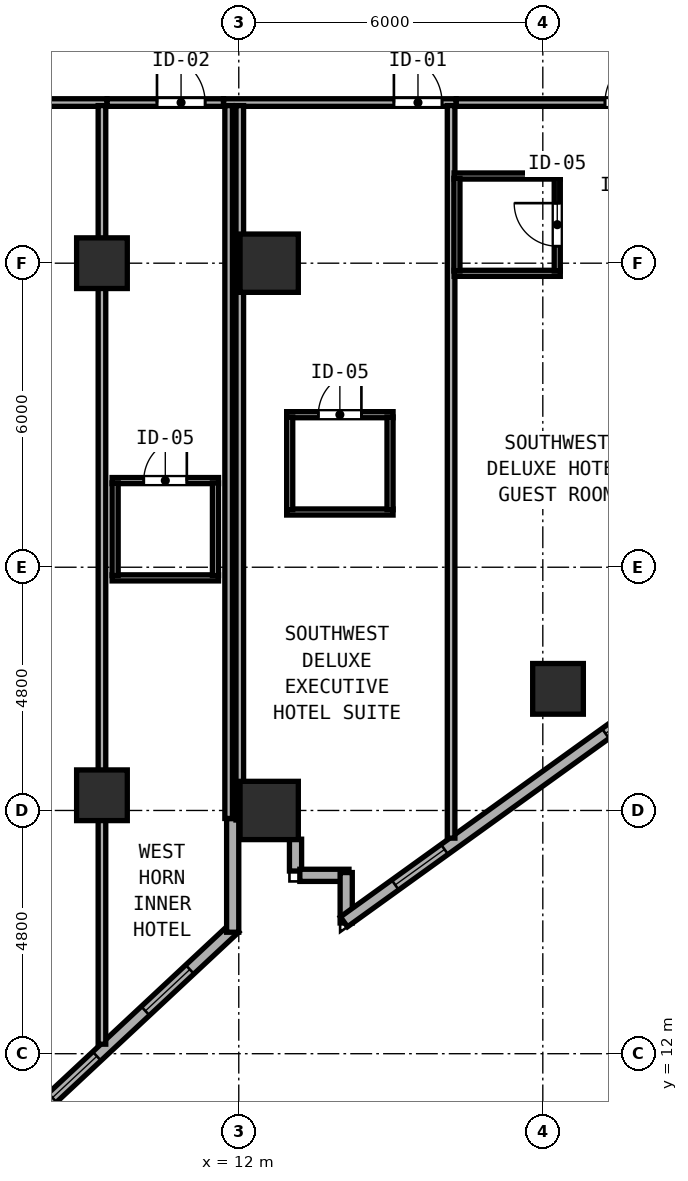
"""IFC4 building model, lengths in metres.
Left out: names, types, materials, properties, quantities, classifications, styles, units other than length and angle.
Written with IfcOpenShell. Run it as: python <this file> out.ifc"""

import sys

from ifc_helpers import new_model, si_unit, direction, frame, frame_2d, origin, origin_2d, place, context, subcontext, project, spatial, rectangle, hollow_rectangle, extrude, element, fill, save


model = new_model("IFC4")
c1 = context("Model", 3, precision=1e-05, world=origin(), true_north=direction((0.0, 1.0)))
c2 = subcontext(c1, "Body", "Model", "MODEL_VIEW")
j1 = project(units=[si_unit("LENGTHUNIT", "METRE"), si_unit("PLANEANGLEUNIT", "RADIAN")], contexts=[c1])
p1 = place(None, origin())
s1 = spatial("IfcSite", under=j1, at=p1, CompositionType="ELEMENT")
p2 = place(p1, origin())
s2 = spatial("IfcBuilding", under=s1, at=p2, CompositionType="ELEMENT")
p3 = place(p2, frame((0.0, 0.0, 78.0)))
s3 = spatial("IfcBuildingStorey", under=s2, at=p3, CompositionType="ELEMENT", Elevation=78.0)
for number, where, z_axis, x_axis in (
    (1, (12.6, 16.8, 0.0), (0.0, 0.0, 1.0), (1.0, 0.0, 0.0)),
    (2, (12.6, 27.6, 0.0), (0.0, 0.0, 1.0), (1.0, 0.0, 0.0)),
):
    element("IfcColumn", number, at=place(p3, frame(where, z_axis=z_axis, x_axis=x_axis)), inside=s3, PredefinedType="COLUMN", context=c2, shape_type="SweptSolid", body=[
        extrude(hollow_rectangle(XDim=1.15, YDim=1.15, WallThickness=0.042, at=origin_2d()), origin(), (0.0, 0.0, 1.0), 3.8),
    ])
for number, where, z_axis, x_axis in (
    (3, (18.3, 19.2, 0.0), (0.0, 0.0, 1.0), (1.0, 0.0, 0.0)),
    (4, (9.3, 17.1, 0.0), (0.0, 0.0, 1.0), (1.0, 0.0, 0.0)),
    (5, (9.3, 27.6, 0.0), (0.0, 0.0, 1.0), (1.0, 0.0, 0.0)),
):
    element("IfcColumn", number, at=place(p3, frame(where, z_axis=z_axis, x_axis=x_axis)), inside=s3, PredefinedType="COLUMN", context=c2, shape_type="SweptSolid", body=[
        extrude(hollow_rectangle(XDim=1.0, YDim=1.0, WallThickness=0.038, at=origin_2d()), origin(), (0.0, 0.0, 1.0), 3.8),
    ])
p4 = place(p3, frame((3.27, 6.416, 0.0), z_axis=(0.0, 0.0, 1.0), x_axis=(0.731064187858, 0.682308693505, 0.0)))
e6 = element("IfcWall", 6, at=p4, inside=s3, PredefinedType="SOLIDWALL", context=c2, shape_type="SweptSolid", body=[
    extrude(rectangle(XDim=11.833, YDim=0.24, at=frame_2d((5.916, 0.0))), origin(), (0.0, 0.0, 1.0), 3.6),
])
p5 = place(p4, frame((1.6, 0.0, 0.85)))
e7 = element("IfcOpeningElement", 7, at=p5, cuts=e6, PredefinedType="OPENING", context=c2, shape_type="SweptSolid", body=[
    extrude(rectangle(XDim=1.2, YDim=1.85, at=frame_2d((0.6, 0.925))), frame((0.0, 0.13, 0.0), z_axis=(0.0, -1.0, 0.0), x_axis=(1.0, 0.0, 0.0)), (0.0, 0.0, 1.0), 0.26),
])
p6 = place(p4, frame((6.912, 0.0, 0.85)))
e8 = element("IfcOpeningElement", 8, at=p6, cuts=e6, PredefinedType="OPENING", context=c2, shape_type="SweptSolid", body=[
    extrude(rectangle(XDim=1.2, YDim=1.85, at=frame_2d((0.6, 0.925))), frame((0.0, 0.13, 0.0), z_axis=(0.0, -1.0, 0.0), x_axis=(1.0, 0.0, 0.0)), (0.0, 0.0, 1.0), 0.26),
])
p7 = place(p4, frame((9.421, 0.0, 0.85)))
e9 = element("IfcOpeningElement", 9, at=p7, cuts=e6, PredefinedType="OPENING", context=c2, shape_type="SweptSolid", body=[
    extrude(rectangle(XDim=1.2, YDim=1.85, at=frame_2d((0.6, 0.925))), frame((0.0, 0.13, 0.0), z_axis=(0.0, -1.0, 0.0), x_axis=(1.0, 0.0, 0.0)), (0.0, 0.0, 1.0), 0.26),
])
p8 = place(p3, frame((11.88, 14.397, 0.0), z_axis=(0.0, 0.0, 1.0), x_axis=(0.0, 1.0, 0.0)))
e10 = element("IfcWall", 10, at=p8, inside=s3, PredefinedType="SOLIDWALL", context=c2, shape_type="SweptSolid", body=[
    extrude(rectangle(XDim=2.243, YDim=0.24, at=frame_2d((1.121, 0.0))), origin(), (0.0, 0.0, 1.0), 3.6),
])
p9 = place(p3, frame((13.12, 16.233, 0.0), z_axis=(0.0, 0.0, 1.0), x_axis=(0.0, -1.0, 0.0)))
e11 = element("IfcWall", 11, at=p9, inside=s3, PredefinedType="SOLIDWALL", context=c2, shape_type="SweptSolid", body=[
    extrude(rectangle(XDim=0.628, YDim=0.24, at=frame_2d((0.314, 0.0))), origin(), (0.0, 0.0, 1.0), 3.6),
])
p10 = place(p3, frame((13.205, 15.52, 0.0), z_axis=(0.0, 0.0, 1.0), x_axis=(1.0, 0.0, 0.0)))
e12 = element("IfcWall", 12, at=p10, inside=s3, PredefinedType="SOLIDWALL", context=c2, shape_type="SweptSolid", body=[
    extrude(rectangle(XDim=0.97, YDim=0.24, at=frame_2d((0.485, 0.0))), origin(), (0.0, 0.0, 1.0), 3.6),
])
p11 = place(p3, frame((14.12, 15.575, 0.0), z_axis=(0.0, 0.0, 1.0), x_axis=(0.0, -1.0, 0.0)))
e13 = element("IfcWall", 13, at=p11, inside=s3, PredefinedType="SOLIDWALL", context=c2, shape_type="SweptSolid", body=[
    extrude(rectangle(XDim=0.996, YDim=0.24, at=frame_2d((0.498, 0.0))), origin(), (0.0, 0.0, 1.0), 3.6),
])
p12 = place(p3, frame((14.075, 14.602, 0.0), z_axis=(0.0, 0.0, 1.0), x_axis=(0.811543176492, 0.58429245476, 0.0)))
e14 = element("IfcWall", 14, at=p12, inside=s3, PredefinedType="SOLIDWALL", context=c2, shape_type="SweptSolid", body=[
    extrude(rectangle(XDim=11.531, YDim=0.24, at=frame_2d((5.765, 0.0))), origin(), (0.0, 0.0, 1.0), 3.097),
])
p13 = place(p12, frame((1.246, 0.0, 0.85)))
e15 = element("IfcOpeningElement", 15, at=p13, cuts=e14, PredefinedType="OPENING", context=c2, shape_type="SweptSolid", body=[
    extrude(rectangle(XDim=1.2, YDim=1.85, at=frame_2d((0.6, 0.925))), frame((0.0, 0.13, 0.0), z_axis=(0.0, -1.0, 0.0), x_axis=(1.0, 0.0, 0.0)), (0.0, 0.0, 1.0), 0.26),
])
p14 = place(p12, frame((6.36, 0.0, 0.85)))
e16 = element("IfcOpeningElement", 16, at=p14, cuts=e14, PredefinedType="OPENING", context=c2, shape_type="SweptSolid", body=[
    extrude(rectangle(XDim=1.2, YDim=1.85, at=frame_2d((0.6, 0.925))), frame((0.0, 0.13, 0.0), z_axis=(0.0, -1.0, 0.0), x_axis=(1.0, 0.0, 0.0)), (0.0, 0.0, 1.0), 0.26),
])
p15 = place(p12, frame((9.07, 0.0, 0.85)))
e17 = element("IfcOpeningElement", 17, at=p15, cuts=e14, PredefinedType="OPENING", context=c2, shape_type="SweptSolid", body=[
    extrude(rectangle(XDim=1.2, YDim=1.85, at=frame_2d((0.6, 0.925))), frame((0.0, 0.13, 0.0), z_axis=(0.0, -1.0, 0.0), x_axis=(1.0, 0.0, 0.0)), (0.0, 0.0, 1.0), 0.26),
])
p16 = place(p3, frame((12.173, 33.524, 0.0), z_axis=(0.0, 0.0, 1.0), x_axis=(-0.963197271032, -0.268795493036, 0.0)))
e18 = element("IfcWall", 18, at=p16, inside=s3, PredefinedType="SOLIDWALL", context=c2, shape_type="SweptSolid", body=[
    extrude(rectangle(XDim=9.095, YDim=0.24, at=frame_2d((4.548, 0.0))), origin(), (0.0, 0.0, 1.0), 3.6),
])
p17 = place(p16, frame((1.6, 0.0, 0.85)))
e19 = element("IfcOpeningElement", 19, at=p17, cuts=e18, PredefinedType="OPENING", context=c2, shape_type="SweptSolid", body=[
    extrude(rectangle(XDim=1.2, YDim=1.85, at=frame_2d((0.6, 0.925))), frame((0.0, 0.13, 0.0), z_axis=(0.0, -1.0, 0.0), x_axis=(1.0, 0.0, 0.0)), (0.0, 0.0, 1.0), 0.26),
])
p18 = place(p16, frame((7.0, 0.0, 0.85)))
e20 = element("IfcOpeningElement", 20, at=p18, cuts=e18, PredefinedType="OPENING", context=c2, shape_type="SweptSolid", body=[
    extrude(rectangle(XDim=1.2, YDim=1.85, at=frame_2d((0.6, 0.925))), frame((0.0, 0.13, 0.0), z_axis=(0.0, -1.0, 0.0), x_axis=(1.0, 0.0, 0.0)), (0.0, 0.0, 1.0), 0.26),
])
p19 = place(p3, frame((11.7, 30.77, 0.0), z_axis=(0.0, 0.0, 1.0), x_axis=(1.0, 0.0, 0.0)))
e21 = element("IfcWall", 21, at=p19, inside=s3, PredefinedType="PARTITIONING", context=c2, shape_type="SweptSolid", body=[
    extrude(rectangle(XDim=4.59, YDim=0.15, at=frame_2d((2.295, 0.0))), origin(), (0.0, 0.0, 1.0), 3.6),
])
p20 = place(p19, frame((4.311, 0.0, 0.0), z_axis=(0.0, 0.0, 1.0), x_axis=(-1.0, 0.0, 0.0)))
e22 = element("IfcOpeningElement", 22, at=p20, cuts=e21, PredefinedType="OPENING", context=c2, shape_type="SweptSolid", body=[
    extrude(rectangle(XDim=0.95, YDim=2.18, at=frame_2d((0.475, 1.09))), frame((0.0, 0.085, 0.0), z_axis=(0.0, -1.0, 0.0), x_axis=(1.0, 0.0, 0.0)), (0.0, 0.0, 1.0), 0.17),
])
p21 = place(p3, frame((11.8, 16.642, 0.0), z_axis=(0.0, 0.0, 1.0), x_axis=(0.0, 1.0, 0.0)))
e23 = element("IfcWall", 23, at=p21, inside=s3, PredefinedType="PARTITIONING", context=c2, shape_type="SweptSolid", body=[
    extrude(rectangle(XDim=14.068, YDim=0.15, at=frame_2d((7.034, 0.0))), origin(), (0.0, 0.0, 1.0), 3.6),
])
p22 = place(p3, frame((16.19, 16.254, 0.0), z_axis=(0.0, 0.0, 1.0), x_axis=(0.0, 1.0, 0.0)))
e24 = element("IfcWall", 24, at=p22, inside=s3, PredefinedType="PARTITIONING", context=c2, shape_type="SweptSolid", body=[
    extrude(rectangle(XDim=14.456, YDim=0.15, at=frame_2d((7.228, 0.0))), origin(), (0.0, 0.0, 1.0), 3.6),
])
p23 = place(p3, frame((12.945, 24.61, 0.0), z_axis=(0.0, 0.0, 1.0), x_axis=(1.0, 0.0, 0.0)))
e25 = element("IfcWall", 25, at=p23, inside=s3, PredefinedType="PARTITIONING", context=c2, shape_type="SweptSolid", body=[
    extrude(rectangle(XDim=2.1, YDim=0.12, at=frame_2d((1.05, 0.0))), origin(), (0.0, 0.0, 1.0), 3.6),
])
p24 = place(p23, frame((1.475, 0.0, 0.0), z_axis=(0.0, 0.0, 1.0), x_axis=(-1.0, 0.0, 0.0)))
e26 = element("IfcOpeningElement", 26, at=p24, cuts=e25, PredefinedType="OPENING", context=c2, shape_type="SweptSolid", body=[
    extrude(rectangle(XDim=0.85, YDim=2.1, at=frame_2d((0.425, 1.05))), frame((0.0, 0.07, 0.0), z_axis=(0.0, -1.0, 0.0), x_axis=(1.0, 0.0, 0.0)), (0.0, 0.0, 1.0), 0.14),
])
p25 = place(p3, frame((12.945, 22.69, 0.0), z_axis=(0.0, 0.0, 1.0), x_axis=(1.0, 0.0, 0.0)))
e27 = element("IfcWall", 27, at=p25, inside=s3, PredefinedType="PARTITIONING", context=c2, shape_type="SweptSolid", body=[
    extrude(rectangle(XDim=2.1, YDim=0.12, at=frame_2d((1.05, 0.0))), origin(), (0.0, 0.0, 1.0), 3.6),
])
for number, where, z_axis, x_axis in (
    (28, (13.005, 22.735, 0.0), (0.0, 0.0, 1.0), (0.0, 1.0, 0.0)),
    (29, (14.985, 22.735, 0.0), (0.0, 0.0, 1.0), (0.0, 1.0, 0.0)),
):
    element("IfcWall", number, at=place(p3, frame(where, z_axis=z_axis, x_axis=x_axis)), inside=s3, PredefinedType="PARTITIONING", context=c2, shape_type="SweptSolid", body=[
        extrude(rectangle(XDim=1.83, YDim=0.12, at=frame_2d((0.915, 0.0))), origin(), (0.0, 0.0, 1.0), 3.6),
    ])
p26 = place(p3, frame((16.292, 30.77, 0.0), z_axis=(0.0, 0.0, 1.0), x_axis=(1.0, 0.0, 0.0)))
e30 = element("IfcWall", 30, at=p26, inside=s3, PredefinedType="PARTITIONING", context=c2, shape_type="SweptSolid", body=[
    extrude(rectangle(XDim=4.148, YDim=0.15, at=frame_2d((2.074, 0.0))), origin(), (0.0, 0.0, 1.0), 3.6),
])
p27 = place(p26, frame((3.885, 0.0, 0.0), z_axis=(0.0, 0.0, 1.0), x_axis=(-1.0, 0.0, 0.0)))
e31 = element("IfcOpeningElement", 31, at=p27, cuts=e30, PredefinedType="OPENING", context=c2, shape_type="SweptSolid", body=[
    extrude(rectangle(XDim=0.95, YDim=2.15, at=frame_2d((0.475, 1.075))), frame((0.0, 0.085, 0.0), z_axis=(0.0, -1.0, 0.0), x_axis=(1.0, 0.0, 0.0)), (0.0, 0.0, 1.0), 0.17),
])
p28 = place(p3, frame((16.25, 29.32, 0.0), z_axis=(0.0, 0.0, 1.0), x_axis=(1.0, 0.0, 0.0)))
e32 = element("IfcWall", 32, at=p28, inside=s3, PredefinedType="PARTITIONING", context=c2, shape_type="SweptSolid", body=[
    extrude(rectangle(XDim=2.095, YDim=0.12, at=frame_2d((1.047, 0.0))), origin(), (0.0, 0.0, 1.0), 3.6),
])
p29 = place(p3, frame((16.25, 27.4, 0.0), z_axis=(0.0, 0.0, 1.0), x_axis=(1.0, 0.0, 0.0)))
e33 = element("IfcWall", 33, at=p29, inside=s3, PredefinedType="PARTITIONING", context=c2, shape_type="SweptSolid", body=[
    extrude(rectangle(XDim=2.095, YDim=0.12, at=frame_2d((1.047, 0.0))), origin(), (0.0, 0.0, 1.0), 3.097),
])
p30 = place(p3, frame((16.305, 27.445, 0.0), z_axis=(0.0, 0.0, 1.0), x_axis=(0.0, 1.0, 0.0)))
e34 = element("IfcWall", 34, at=p30, inside=s3, PredefinedType="PARTITIONING", context=c2, shape_type="SweptSolid", body=[
    extrude(rectangle(XDim=1.83, YDim=0.12, at=frame_2d((0.915, 0.0))), origin(), (0.0, 0.0, 1.0), 3.6),
])
p31 = place(p3, frame((18.285, 27.445, 0.0), z_axis=(0.0, 0.0, 1.0), x_axis=(0.0, 1.0, 0.0)))
e35 = element("IfcWall", 35, at=p31, inside=s3, PredefinedType="PARTITIONING", context=c2, shape_type="SweptSolid", body=[
    extrude(rectangle(XDim=1.83, YDim=0.12, at=frame_2d((0.915, 0.0))), origin(), (0.0, 0.0, 1.0), 3.6),
])
p32 = place(p31, frame((0.49, 0.0, 0.0)))
e36 = element("IfcOpeningElement", 36, at=p32, cuts=e35, PredefinedType="OPENING", context=c2, shape_type="SweptSolid", body=[
    extrude(rectangle(XDim=0.85, YDim=2.1, at=frame_2d((0.425, 1.05))), frame((0.0, 0.07, 0.0), z_axis=(0.0, -1.0, 0.0), x_axis=(1.0, 0.0, 0.0)), (0.0, 0.0, 1.0), 0.14),
])
p33 = place(p3, frame((3.311, 30.77, 0.0), z_axis=(0.0, 0.0, 1.0), x_axis=(1.0, 0.0, 0.0)))
e37 = element("IfcWall", 37, at=p33, inside=s3, PredefinedType="PARTITIONING", context=c2, shape_type="SweptSolid", body=[
    extrude(rectangle(XDim=6.089, YDim=0.15, at=frame_2d((3.044, 0.0))), origin(), (0.0, 0.0, 1.0), 3.6),
])
p34 = place(p33, frame((4.801, 0.0, 0.0), z_axis=(0.0, 0.0, 1.0), x_axis=(-1.0, 0.0, 0.0)))
e38 = element("IfcOpeningElement", 38, at=p34, cuts=e37, PredefinedType="OPENING", context=c2, shape_type="SweptSolid", body=[
    extrude(rectangle(XDim=0.95, YDim=2.18, at=frame_2d((0.475, 1.09))), frame((0.0, 0.085, 0.0), z_axis=(0.0, -1.0, 0.0), x_axis=(1.0, 0.0, 0.0)), (0.0, 0.0, 1.0), 0.17),
])
p35 = place(p3, frame((9.3, 12.188, 0.0), z_axis=(0.0, 0.0, 1.0), x_axis=(0.0, 1.0, 0.0)))
e39 = element("IfcWall", 39, at=p35, inside=s3, PredefinedType="PARTITIONING", context=c2, shape_type="SweptSolid", body=[
    extrude(rectangle(XDim=18.522, YDim=0.15, at=frame_2d((9.261, 0.0))), origin(), (0.0, 0.0, 1.0), 3.6),
])
p36 = place(p3, frame((9.402, 30.77, 0.0), z_axis=(0.0, 0.0, 1.0), x_axis=(1.0, 0.0, 0.0)))
e40 = element("IfcWall", 40, at=p36, inside=s3, PredefinedType="PARTITIONING", context=c2, shape_type="SweptSolid", body=[
    extrude(rectangle(XDim=2.296, YDim=0.15, at=frame_2d((1.148, 0.0))), origin(), (0.0, 0.0, 1.0), 3.6),
])
p37 = place(p36, frame((1.934, 0.0, 0.0), z_axis=(0.0, 0.0, 1.0), x_axis=(-1.0, 0.0, 0.0)))
e41 = element("IfcOpeningElement", 41, at=p37, cuts=e40, PredefinedType="OPENING", context=c2, shape_type="SweptSolid", body=[
    extrude(rectangle(XDim=0.95, YDim=2.15, at=frame_2d((0.475, 1.075))), frame((0.0, 0.085, 0.0), z_axis=(0.0, -1.0, 0.0), x_axis=(1.0, 0.0, 0.0)), (0.0, 0.0, 1.0), 0.17),
])
p38 = place(p3, frame((12.02, 16.612, 0.0), z_axis=(0.0, 0.0, 1.0), x_axis=(0.0, 1.0, 0.0)))
e42 = element("IfcWall", 42, at=p38, inside=s3, PredefinedType="PARTITIONING", context=c2, shape_type="SweptSolid", body=[
    extrude(rectangle(XDim=14.098, YDim=0.15, at=frame_2d((7.049, 0.0))), origin(), (0.0, 0.0, 1.0), 3.6),
])
p39 = place(p3, frame((9.5, 23.31, 0.0), z_axis=(0.0, 0.0, 1.0), x_axis=(1.0, 0.0, 0.0)))
e43 = element("IfcWall", 43, at=p39, inside=s3, PredefinedType="PARTITIONING", context=c2, shape_type="SweptSolid", body=[
    extrude(rectangle(XDim=2.1, YDim=0.12, at=frame_2d((1.05, 0.0))), origin(), (0.0, 0.0, 1.0), 3.6),
])
p40 = place(p39, frame((1.475, 0.0, 0.0), z_axis=(0.0, 0.0, 1.0), x_axis=(-1.0, 0.0, 0.0)))
e44 = element("IfcOpeningElement", 44, at=p40, cuts=e43, PredefinedType="OPENING", context=c2, shape_type="SweptSolid", body=[
    extrude(rectangle(XDim=0.85, YDim=2.1, at=frame_2d((0.425, 1.05))), frame((0.0, 0.07, 0.0), z_axis=(0.0, -1.0, 0.0), x_axis=(1.0, 0.0, 0.0)), (0.0, 0.0, 1.0), 0.14),
])
p41 = place(p3, frame((9.5, 21.39, 0.0), z_axis=(0.0, 0.0, 1.0), x_axis=(1.0, 0.0, 0.0)))
e45 = element("IfcWall", 45, at=p41, inside=s3, PredefinedType="PARTITIONING", context=c2, shape_type="SweptSolid", body=[
    extrude(rectangle(XDim=2.1, YDim=0.12, at=frame_2d((1.05, 0.0))), origin(), (0.0, 0.0, 1.0), 3.6),
])
for number, where, z_axis, x_axis in (
    (46, (9.56, 21.435, 0.0), (0.0, 0.0, 1.0), (0.0, 1.0, 0.0)),
    (47, (11.54, 21.435, 0.0), (0.0, 0.0, 1.0), (0.0, 1.0, 0.0)),
):
    element("IfcWall", number, at=place(p3, frame(where, z_axis=z_axis, x_axis=x_axis)), inside=s3, PredefinedType="PARTITIONING", context=c2, shape_type="SweptSolid", body=[
        extrude(rectangle(XDim=1.83, YDim=0.12, at=frame_2d((0.915, 0.0))), origin(), (0.0, 0.0, 1.0), 3.6),
    ])
p42 = place(p6, origin())
e48 = element("IfcWindow", 48, at=p42, inside=s3, PartitioningType="SINGLE_PANEL", PredefinedType="WINDOW", context=c2, shape_type="SweptSolid", body=[
    extrude(rectangle(XDim=1.2, YDim=1.85, at=frame_2d((0.6, 0.925))), frame((0.0, 0.03, 0.0), z_axis=(0.0, -1.0, 0.0), x_axis=(1.0, 0.0, 0.0)), (0.0, 0.0, 1.0), 0.06),
])
fill(e8, e48)
p43 = place(p13, origin())
e49 = element("IfcWindow", 49, at=p43, inside=s3, PartitioningType="SINGLE_PANEL", PredefinedType="WINDOW", context=c2, shape_type="SweptSolid", body=[
    extrude(rectangle(XDim=1.2, YDim=1.85, at=frame_2d((0.6, 0.925))), frame((0.0, 0.03, 0.0), z_axis=(0.0, -1.0, 0.0), x_axis=(1.0, 0.0, 0.0)), (0.0, 0.0, 1.0), 0.06),
])
fill(e15, e49)
p44 = place(p14, origin())
e50 = element("IfcWindow", 50, at=p44, inside=s3, PartitioningType="SINGLE_PANEL", PredefinedType="WINDOW", context=c2, shape_type="SweptSolid", body=[
    extrude(rectangle(XDim=1.2, YDim=1.85, at=frame_2d((0.6, 0.925))), frame((0.0, 0.03, 0.0), z_axis=(0.0, -1.0, 0.0), x_axis=(1.0, 0.0, 0.0)), (0.0, 0.0, 1.0), 0.06),
])
fill(e16, e50)
p45 = place(p20, origin())
e51 = element("IfcDoor", 51, at=p45, inside=s3, OperationType="SINGLE_SWING_RIGHT", PredefinedType="DOOR", context=c2, shape_type="SweptSolid", body=[
    extrude(rectangle(XDim=0.95, YDim=2.18, at=frame_2d((0.475, 1.09))), frame((0.0, 0.025, 0.0), z_axis=(0.0, -1.0, 0.0), x_axis=(1.0, 0.0, 0.0)), (0.0, 0.0, 1.0), 0.05),
])
fill(e22, e51)
p46 = place(p24, origin())
e52 = element("IfcDoor", 52, at=p46, inside=s3, OperationType="SINGLE_SWING_LEFT", PredefinedType="DOOR", context=c2, shape_type="SweptSolid", body=[
    extrude(rectangle(XDim=0.85, YDim=2.1, at=frame_2d((0.425, 1.05))), frame((0.0, 0.025, 0.0), z_axis=(0.0, -1.0, 0.0), x_axis=(1.0, 0.0, 0.0)), (0.0, 0.0, 1.0), 0.05),
])
fill(e26, e52)
p47 = place(p27, origin())
e53 = element("IfcDoor", 53, at=p47, inside=s3, OperationType="SINGLE_SWING_LEFT", PredefinedType="DOOR", context=c2, shape_type="SweptSolid", body=[
    extrude(rectangle(XDim=0.95, YDim=2.15, at=frame_2d((0.475, 1.075))), frame((0.0, 0.025, 0.0), z_axis=(0.0, -1.0, 0.0), x_axis=(1.0, 0.0, 0.0)), (0.0, 0.0, 1.0), 0.05),
])
fill(e31, e53)
p48 = place(p32, origin())
e54 = element("IfcDoor", 54, at=p48, inside=s3, OperationType="SINGLE_SWING_RIGHT", PredefinedType="DOOR", context=c2, shape_type="SweptSolid", body=[
    extrude(rectangle(XDim=0.85, YDim=2.1, at=frame_2d((0.425, 1.05))), frame((0.0, 0.025, 0.0), z_axis=(0.0, -1.0, 0.0), x_axis=(1.0, 0.0, 0.0)), (0.0, 0.0, 1.0), 0.05),
])
fill(e36, e54)
p49 = place(p37, origin())
e55 = element("IfcDoor", 55, at=p49, inside=s3, OperationType="SINGLE_SWING_RIGHT", PredefinedType="DOOR", context=c2, shape_type="SweptSolid", body=[
    extrude(rectangle(XDim=0.95, YDim=2.15, at=frame_2d((0.475, 1.075))), frame((0.0, 0.025, 0.0), z_axis=(0.0, -1.0, 0.0), x_axis=(1.0, 0.0, 0.0)), (0.0, 0.0, 1.0), 0.05),
])
fill(e41, e55)
p50 = place(p40, origin())
e56 = element("IfcDoor", 56, at=p50, inside=s3, OperationType="SINGLE_SWING_LEFT", PredefinedType="DOOR", context=c2, shape_type="SweptSolid", body=[
    extrude(rectangle(XDim=0.85, YDim=2.1, at=frame_2d((0.425, 1.05))), frame((0.0, 0.025, 0.0), z_axis=(0.0, -1.0, 0.0), x_axis=(1.0, 0.0, 0.0)), (0.0, 0.0, 1.0), 0.05),
])
fill(e44, e56)
p51 = place(p7, origin())
e57 = element("IfcWindow", 57, at=p51, inside=s3, PartitioningType="SINGLE_PANEL", PredefinedType="WINDOW", context=c2, shape_type="SweptSolid", body=[
    extrude(rectangle(XDim=1.2, YDim=1.85, at=frame_2d((0.6, 0.925))), frame((0.0, 0.03, 0.0), z_axis=(0.0, -1.0, 0.0), x_axis=(1.0, 0.0, 0.0)), (0.0, 0.0, 1.0), 0.06),
])
fill(e9, e57)
save(model, sys.argv[1])
